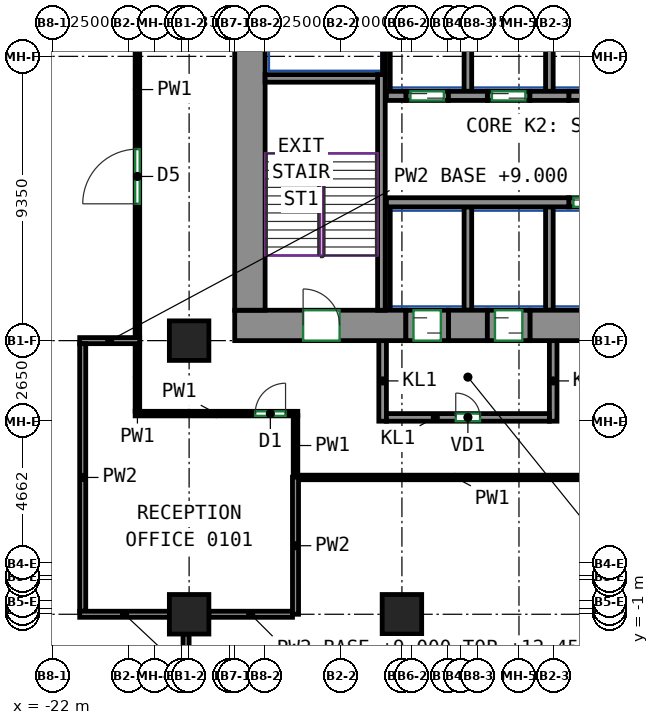
"""IFC4 building model, lengths in metres.
Left out: names, types, materials, properties, quantities, classifications, styles, units other than length and angle.
Written with IfcOpenShell. Run it as: python <this file> out.ifc"""

import sys

from ifc_helpers import new_model, si_unit, direction, frame, frame_2d, origin, origin_2d, place, context, subcontext, project, spatial, rectangle, extrude, source, transform, mapped, element, fill, save


model = new_model("IFC4")
c1 = context("Model", 3, precision=1e-05, world=origin(), true_north=direction((0.0, 1.0)))
c2 = subcontext(c1, "Body", "Model", "MODEL_VIEW")
j1 = project(units=[si_unit("LENGTHUNIT", "METRE"), si_unit("PLANEANGLEUNIT", "RADIAN")], contexts=[c1])
p1 = place(None, origin())
s1 = spatial("IfcSite", under=j1, at=p1, CompositionType="ELEMENT")
p2 = place(p1, origin())
s2 = spatial("IfcBuilding", under=s1, at=p2, CompositionType="ELEMENT")
p3 = place(p2, frame((0.0, 0.0, 9.0)))
s3 = spatial("IfcBuildingStorey", under=s2, at=p3, CompositionType="ELEMENT", Elevation=9.0)
m1 = source(origin(), c2, "Body", "SweptSolid", [
    extrude(rectangle(XDim=1.3, YDim=1.3, at=origin_2d()), origin(), (0.0, 0.0, 1.0), 4.1),
])
for number, where, z_axis, x_axis in (
    (1, (-17.5, -1.0, 0.0), (0.0, 0.0, 1.0), (1.0, 0.0, 0.0)),
    (2, (-17.5, 8.0, 0.0), (0.0, 0.0, 1.0), (1.0, 0.0, 0.0)),
    (3, (-10.5, -1.0, 0.0), (0.0, 0.0, 1.0), (1.0, 0.0, 0.0)),
):
    element("IfcColumn", number, at=place(p3, frame(where, z_axis=z_axis, x_axis=x_axis)), inside=s3, PredefinedType="COLUMN", context=c2, shape_type="MappedRepresentation", body=[
        mapped(m1, transform((0.0, 0.0, 0.0))),
    ])
m2 = source(origin(), c2, "Body", "SweptSolid", [
    extrude(rectangle(XDim=5.63, YDim=1.0, at=frame_2d((2.815, 0.0))), origin(), (0.0, 0.0, 1.0), 4.1),
])
p4 = place(p3, frame((-16.0, 8.5, 0.0), z_axis=(0.0, 0.0, 1.0), x_axis=(1.0, 0.0, 0.0)))
e4 = element("IfcWall", 4, at=p4, inside=s3, PredefinedType="SHEAR", context=c2, shape_type="MappedRepresentation", body=[
    mapped(m2, transform((0.0, 0.0, 0.0))),
])
p5 = place(p4, frame((2.25, 0.0, 0.0)))
e5 = element("IfcOpeningElement", 5, at=p5, cuts=e4, PredefinedType="OPENING", context=c2, shape_type="SweptSolid", body=[
    extrude(rectangle(XDim=1.2, YDim=2.1, at=frame_2d((0.6, 1.05))), frame((0.0, 0.51, 0.0), z_axis=(0.0, -1.0, 0.0), x_axis=(1.0, 0.0, 0.0)), (0.0, 0.0, 1.0), 1.02),
])
m3 = source(origin(), c2, "Body", "SweptSolid", [
    extrude(rectangle(XDim=1.28, YDim=1.0, at=frame_2d((0.64, 0.0))), origin(), (0.0, 0.0, 1.0), 4.1),
])
p6 = place(p3, frame((-8.97, 8.5, 0.0), z_axis=(0.0, 0.0, 1.0), x_axis=(1.0, 0.0, 0.0)))
e6 = element("IfcWall", 6, at=p6, inside=s3, PredefinedType="SHEAR", context=c2, shape_type="MappedRepresentation", body=[
    mapped(m3, transform((0.0, 0.0, 0.0))),
])
m4 = source(origin(), c2, "Body", "SweptSolid", [
    extrude(rectangle(XDim=14.18, YDim=1.0, at=frame_2d((7.09, 0.0))), origin(), (0.0, 0.0, 1.0), 4.1),
])
p7 = place(p3, frame((-6.29, 8.5, 0.0), z_axis=(0.0, 0.0, 1.0), x_axis=(1.0, 0.0, 0.0)))
e7 = element("IfcWall", 7, at=p7, inside=s3, PredefinedType="SHEAR", context=c2, shape_type="MappedRepresentation", body=[
    mapped(m4, transform((0.0, 0.0, 0.0))),
])
m5 = source(origin(), c2, "Body", "SweptSolid", [
    extrude(rectangle(XDim=12.0, YDim=1.0, at=frame_2d((6.0, 0.0))), origin(), (0.0, 0.0, 1.0), 4.1),
])
p8 = place(p3, frame((-15.5, 9.0, 0.0), z_axis=(0.0, 0.0, 1.0), x_axis=(0.0, 1.0, 0.0)))
e8 = element("IfcWall", 8, at=p8, inside=s3, PredefinedType="SHEAR", context=c2, shape_type="MappedRepresentation", body=[
    mapped(m5, transform((0.0, 0.0, 0.0))),
])
m6 = source(origin(), c2, "Body", "SweptSolid", [
    extrude(rectangle(XDim=7.75, YDim=0.25, at=frame_2d((3.875, 0.0))), origin(), (0.0, 0.0, 1.0), 4.1),
])
p9 = place(p3, frame((-11.175, 9.0, 0.0), z_axis=(0.0, 0.0, 1.0), x_axis=(0.0, 1.0, 0.0)))
e9 = element("IfcWall", 9, at=p9, inside=s3, PredefinedType="SHEAR", context=c2, shape_type="MappedRepresentation", body=[
    mapped(m6, transform((0.0, 0.0, 0.0))),
])
m7 = source(origin(), c2, "Body", "SweptSolid", [
    extrude(rectangle(XDim=3.7, YDim=0.25, at=frame_2d((1.85, 0.0))), origin(), (0.0, 0.0, 1.0), 4.1),
])
p10 = place(p3, frame((-15.0, 16.625, 0.0), z_axis=(0.0, 0.0, 1.0), x_axis=(1.0, 0.0, 0.0)))
e10 = element("IfcWall", 10, at=p10, inside=s3, PredefinedType="SHEAR", context=c2, shape_type="MappedRepresentation", body=[
    mapped(m7, transform((0.0, 0.0, 0.0))),
])
m8 = source(origin(), c2, "Body", "SweptSolid", [
    extrude(rectangle(XDim=6.0, YDim=0.3, at=frame_2d((3.0, 0.0))), origin(), (0.0, 0.0, 1.0), 4.1),
])
p11 = place(p3, frame((-11.01, 12.55, 0.0), z_axis=(0.0, 0.0, 1.0), x_axis=(1.0, 0.0, 0.0)))
e11 = element("IfcWall", 11, at=p11, inside=s3, PredefinedType="SHEAR", context=c2, shape_type="MappedRepresentation", body=[
    mapped(m8, transform((0.0, 0.0, 0.0))),
])
m9 = source(origin(), c2, "Body", "SweptSolid", [
    extrude(rectangle(XDim=0.64, YDim=0.3, at=frame_2d((0.32, 0.0))), origin(), (0.0, 0.0, 1.0), 4.1),
])
p12 = place(p3, frame((-11.01, 16.05, 0.0), z_axis=(0.0, 0.0, 1.0), x_axis=(1.0, 0.0, 0.0)))
e12 = element("IfcWall", 12, at=p12, inside=s3, PredefinedType="SHEAR", context=c2, shape_type="MappedRepresentation", body=[
    mapped(m9, transform((0.0, 0.0, 0.0))),
])
m10 = source(origin(), c2, "Body", "SweptSolid", [
    extrude(rectangle(XDim=1.28, YDim=0.3, at=frame_2d((0.64, 0.0))), origin(), (0.0, 0.0, 1.0), 4.1),
])
for number, where, z_axis, x_axis in (
    (13, (-8.97, 16.05, 0.0), (0.0, 0.0, 1.0), (1.0, 0.0, 0.0)),
    (14, (-6.29, 16.05, 0.0), (0.0, 0.0, 1.0), (1.0, 0.0, 0.0)),
):
    element("IfcWall", number, at=place(p3, frame(where, z_axis=z_axis, x_axis=x_axis)), inside=s3, PredefinedType="SHEAR", context=c2, shape_type="MappedRepresentation", body=[
        mapped(m10, transform((0.0, 0.0, 0.0))),
    ])
m11 = source(origin(), c2, "Body", "SweptSolid", [
    extrude(rectangle(XDim=1.4, YDim=0.3, at=frame_2d((0.7, 0.0))), origin(), (0.0, 0.0, 1.0), 4.1),
])
p13 = place(p3, frame((-5.01, 12.55, 0.0), z_axis=(0.0, 0.0, 1.0), x_axis=(1.0, 0.0, 0.0)))
e15 = element("IfcWall", 15, at=p13, inside=s3, PredefinedType="PARTITIONING", context=c2, shape_type="MappedRepresentation", body=[
    mapped(m11, transform((0.0, 0.0, 0.0))),
])
p14 = place(p13, frame((0.15, 0.0, 0.0)))
e16 = element("IfcOpeningElement", 16, at=p14, cuts=e15, PredefinedType="OPENING", context=c2, shape_type="SweptSolid", body=[
    extrude(rectangle(XDim=1.1, YDim=2.1, at=frame_2d((0.55, 1.05))), frame((0.0, 0.16, 0.0), z_axis=(0.0, -1.0, 0.0), x_axis=(1.0, 0.0, 0.0)), (0.0, 0.0, 1.0), 0.32),
])
m12 = source(origin(), c2, "Body", "SweptSolid", [
    extrude(rectangle(XDim=1.4, YDim=0.3, at=frame_2d((0.7, 0.0))), origin(), (0.0, 0.0, 1.0), 4.1),
])
p15 = place(p3, frame((-10.37, 16.05, 0.0), z_axis=(0.0, 0.0, 1.0), x_axis=(1.0, 0.0, 0.0)))
e17 = element("IfcWall", 17, at=p15, inside=s3, PredefinedType="PARTITIONING", context=c2, shape_type="MappedRepresentation", body=[
    mapped(m12, transform((0.0, 0.0, 0.0))),
])
p16 = place(p15, frame((0.15, 0.0, 0.0)))
e18 = element("IfcOpeningElement", 18, at=p16, cuts=e17, PredefinedType="OPENING", context=c2, shape_type="SweptSolid", body=[
    extrude(rectangle(XDim=1.1, YDim=2.1, at=frame_2d((0.55, 1.05))), frame((0.0, 0.16, 0.0), z_axis=(0.0, -1.0, 0.0), x_axis=(1.0, 0.0, 0.0)), (0.0, 0.0, 1.0), 0.32),
])
p17 = place(p3, frame((-7.69, 16.05, 0.0), z_axis=(0.0, 0.0, 1.0), x_axis=(1.0, 0.0, 0.0)))
e19 = element("IfcWall", 19, at=p17, inside=s3, PredefinedType="PARTITIONING", context=c2, shape_type="MappedRepresentation", body=[
    mapped(m11, transform((0.0, 0.0, 0.0))),
])
p18 = place(p17, frame((0.15, 0.0, 0.0)))
e20 = element("IfcOpeningElement", 20, at=p18, cuts=e19, PredefinedType="OPENING", context=c2, shape_type="SweptSolid", body=[
    extrude(rectangle(XDim=1.1, YDim=2.1, at=frame_2d((0.55, 1.05))), frame((0.0, 0.16, 0.0), z_axis=(0.0, -1.0, 0.0), x_axis=(1.0, 0.0, 0.0)), (0.0, 0.0, 1.0), 0.32),
])
p19 = place(p3, frame((-5.01, 16.05, 0.0), z_axis=(0.0, 0.0, 1.0), x_axis=(1.0, 0.0, 0.0)))
e21 = element("IfcWall", 21, at=p19, inside=s3, PredefinedType="PARTITIONING", context=c2, shape_type="MappedRepresentation", body=[
    mapped(m11, transform((0.0, 0.0, 0.0))),
])
m13 = source(origin(), c2, "Body", "SweptSolid", [
    extrude(rectangle(XDim=2.65, YDim=0.25, at=frame_2d((1.325, 0.0))), origin(), (0.0, 0.0, 1.0), 4.1),
])
for number, where, z_axis, x_axis in (
    (22, (-11.135, 5.35, 0.0), (0.0, 0.0, 1.0), (0.0, 1.0, 0.0)),
    (23, (-5.525, 5.35, 0.0), (0.0, 0.0, 1.0), (0.0, 1.0, 0.0)),
):
    element("IfcWall", number, at=place(p3, frame(where, z_axis=z_axis, x_axis=x_axis)), inside=s3, PredefinedType="PARTITIONING", context=c2, shape_type="MappedRepresentation", body=[
        mapped(m13, transform((0.0, 0.0, 0.0))),
    ])
m14 = source(origin(), c2, "Body", "SweptSolid", [
    extrude(rectangle(XDim=5.36, YDim=0.25, at=frame_2d((2.68, 0.0))), origin(), (0.0, 0.0, 1.0), 4.1),
])
p20 = place(p3, frame((-11.01, 5.475, 0.0), z_axis=(0.0, 0.0, 1.0), x_axis=(1.0, 0.0, 0.0)))
e24 = element("IfcWall", 24, at=p20, inside=s3, PredefinedType="PARTITIONING", context=c2, shape_type="MappedRepresentation", body=[
    mapped(m14, transform((0.0, 0.0, 0.0))),
])
p21 = place(p20, frame((2.28, 0.0, 0.0)))
e25 = element("IfcOpeningElement", 25, at=p21, cuts=e24, PredefinedType="OPENING", context=c2, shape_type="SweptSolid", body=[
    extrude(rectangle(XDim=0.8, YDim=2.0, at=frame_2d((0.4, 1.0))), frame((0.0, 0.135, 0.0), z_axis=(0.0, -1.0, 0.0), x_axis=(1.0, 0.0, 0.0)), (0.0, 0.0, 1.0), 0.27),
])
m15 = source(origin(), c2, "Body", "SweptSolid", [
    extrude(rectangle(XDim=3.275, YDim=0.165, at=frame_2d((1.638, 0.0))), origin(), (0.0, 0.0, 1.0), 4.1),
])
p22 = place(p3, frame((-10.968, 16.2, 0.0), z_axis=(0.0, 0.0, 1.0), x_axis=(0.0, 1.0, 0.0)))
e26 = element("IfcWall", 26, at=p22, inside=s3, PredefinedType="PARTITIONING", context=c2, shape_type="MappedRepresentation", body=[
    mapped(m15, transform((0.0, 0.0, 0.0))),
])
m16 = source(origin(), c2, "Body", "SweptSolid", [
    extrude(rectangle(XDim=2.725, YDim=0.085, at=frame_2d((1.363, 0.0))), origin(), (0.0, 0.0, 1.0), 4.1),
])
p23 = place(p3, frame((-11.093, 16.75, 0.0), z_axis=(0.0, 0.0, 1.0), x_axis=(0.0, 1.0, 0.0)))
e27 = element("IfcWall", 27, at=p23, inside=s3, PredefinedType="PARTITIONING", context=c2, shape_type="MappedRepresentation", body=[
    mapped(m16, transform((0.0, 0.0, 0.0))),
])
m17 = source(origin(), c2, "Body", "SweptSolid", [
    extrude(rectangle(XDim=3.275, YDim=0.25, at=frame_2d((1.638, 0.0))), origin(), (0.0, 0.0, 1.0), 4.1),
])
for number, where, z_axis, x_axis in (
    (28, (-5.65, 16.2, 0.0), (0.0, 0.0, 1.0), (0.0, 1.0, 0.0)),
    (29, (-8.33, 16.2, 0.0), (0.0, 0.0, 1.0), (0.0, 1.0, 0.0)),
):
    element("IfcWall", number, at=place(p3, frame(where, z_axis=z_axis, x_axis=x_axis)), inside=s3, PredefinedType="PARTITIONING", context=c2, shape_type="MappedRepresentation", body=[
        mapped(m17, transform((0.0, 0.0, 0.0))),
    ])
m18 = source(origin(), c2, "Body", "SweptSolid", [
    extrude(rectangle(XDim=3.4, YDim=0.165, at=frame_2d((1.7, 0.0))), origin(), (0.0, 0.0, 1.0), 4.1),
])
p24 = place(p3, frame((-10.968, 9.0, 0.0), z_axis=(0.0, 0.0, 1.0), x_axis=(0.0, 1.0, 0.0)))
e30 = element("IfcWall", 30, at=p24, inside=s3, PredefinedType="PARTITIONING", context=c2, shape_type="MappedRepresentation", body=[
    mapped(m18, transform((0.0, 0.0, 0.0))),
])
m19 = source(origin(), c2, "Body", "SweptSolid", [
    extrude(rectangle(XDim=3.4, YDim=0.25, at=frame_2d((1.7, 0.0))), origin(), (0.0, 0.0, 1.0), 4.1),
])
for number, where, z_axis, x_axis in (
    (31, (-5.65, 9.0, 0.0), (0.0, 0.0, 1.0), (0.0, 1.0, 0.0)),
    (32, (-8.33, 9.0, 0.0), (0.0, 0.0, 1.0), (0.0, 1.0, 0.0)),
):
    element("IfcWall", number, at=place(p3, frame(where, z_axis=z_axis, x_axis=x_axis)), inside=s3, PredefinedType="PARTITIONING", context=c2, shape_type="MappedRepresentation", body=[
        mapped(m19, transform((0.0, 0.0, 0.0))),
    ])
m20 = source(origin(), c2, "Body", "SweptSolid", [
    extrude(rectangle(XDim=1.4, YDim=1.0, at=frame_2d((0.7, 0.0))), origin(), (0.0, 0.0, 1.0), 2.7),
])
p25 = place(p3, frame((-10.37, 8.5, 0.0), z_axis=(0.0, 0.0, 1.0), x_axis=(1.0, 0.0, 0.0)))
e33 = element("IfcWall", 33, at=p25, inside=s3, PredefinedType="PARTITIONING", context=c2, shape_type="MappedRepresentation", body=[
    mapped(m20, transform((0.0, 0.0, 0.0))),
])
p26 = place(p25, frame((0.25, 0.0, 0.0)))
e34 = element("IfcOpeningElement", 34, at=p26, cuts=e33, PredefinedType="OPENING", context=c2, shape_type="SweptSolid", body=[
    extrude(rectangle(XDim=0.9, YDim=2.1, at=frame_2d((0.45, 1.05))), frame((0.0, 0.51, 0.0), z_axis=(0.0, -1.0, 0.0), x_axis=(1.0, 0.0, 0.0)), (0.0, 0.0, 1.0), 1.02),
])
m21 = source(origin(), c2, "Body", "SweptSolid", [
    extrude(rectangle(XDim=1.4, YDim=1.0, at=frame_2d((0.7, 0.0))), origin(), (0.0, 0.0, 1.0), 2.7),
])
p27 = place(p3, frame((-7.69, 8.5, 0.0), z_axis=(0.0, 0.0, 1.0), x_axis=(1.0, 0.0, 0.0)))
e35 = element("IfcWall", 35, at=p27, inside=s3, PredefinedType="PARTITIONING", context=c2, shape_type="MappedRepresentation", body=[
    mapped(m21, transform((0.0, 0.0, 0.0))),
])
p28 = place(p27, frame((0.25, 0.0, 0.0)))
e36 = element("IfcOpeningElement", 36, at=p28, cuts=e35, PredefinedType="OPENING", context=c2, shape_type="SweptSolid", body=[
    extrude(rectangle(XDim=0.9, YDim=2.1, at=frame_2d((0.45, 1.05))), frame((0.0, 0.51, 0.0), z_axis=(0.0, -1.0, 0.0), x_axis=(1.0, 0.0, 0.0)), (0.0, 0.0, 1.0), 1.02),
])
p29 = place(p3, frame((-19.2, 8.09, 0.0), z_axis=(0.0, 0.0, 1.0), x_axis=(0.0, 1.0, 0.0)))
e37 = element("IfcWall", 37, at=p29, inside=s3, PredefinedType="PARTITIONING", context=c2, shape_type="SweptSolid", body=[
    extrude(rectangle(XDim=16.335, YDim=0.15, at=frame_2d((8.167, 0.0))), origin(), (0.0, 0.0, 1.0), 4.1),
])
p30 = place(p29, frame((4.41, 0.0, 0.0)))
e38 = element("IfcOpeningElement", 38, at=p30, cuts=e37, PredefinedType="OPENING", context=c2, shape_type="SweptSolid", body=[
    extrude(rectangle(XDim=1.8, YDim=2.1, at=frame_2d((0.9, 1.05))), frame((0.0, 0.085, 0.0), z_axis=(0.0, -1.0, 0.0), x_axis=(1.0, 0.0, 0.0)), (0.0, 0.0, 1.0), 0.17),
])
p31 = place(p3, frame((-14.0, 5.525, 0.0), z_axis=(0.0, 0.0, 1.0), x_axis=(0.0, -1.0, 0.0)))
e39 = element("IfcWall", 39, at=p31, inside=s3, PredefinedType="PARTITIONING", context=c2, shape_type="SweptSolid", body=[
    extrude(rectangle(XDim=1.95, YDim=0.15, at=frame_2d((0.975, 0.0))), origin(), (0.0, 0.0, 1.0), 4.1),
])
p32 = place(p3, frame((-19.275, 5.6, 0.0), z_axis=(0.0, 0.0, 1.0), x_axis=(1.0, 0.0, 0.0)))
e40 = element("IfcWall", 40, at=p32, inside=s3, PredefinedType="PARTITIONING", context=c2, shape_type="SweptSolid", body=[
    extrude(rectangle(XDim=5.35, YDim=0.15, at=frame_2d((2.675, 0.0))), origin(), (0.0, 0.0, 1.0), 4.1),
])
p33 = place(p32, frame((3.947, 0.0, 0.0)))
e41 = element("IfcOpeningElement", 41, at=p33, cuts=e40, PredefinedType="OPENING", context=c2, shape_type="SweptSolid", body=[
    extrude(rectangle(XDim=1.0, YDim=2.1, at=frame_2d((0.5, 1.05))), frame((0.0, 0.085, 0.0), z_axis=(0.0, -1.0, 0.0), x_axis=(1.0, 0.0, 0.0)), (0.0, 0.0, 1.0), 0.17),
])
p34 = place(p3, frame((-19.2, 5.675, 0.0), z_axis=(0.0, 0.0, 1.0), x_axis=(0.0, 1.0, 0.0)))
e42 = element("IfcWall", 42, at=p34, inside=s3, PredefinedType="PARTITIONING", context=c2, shape_type="SweptSolid", body=[
    extrude(rectangle(XDim=2.235, YDim=0.15, at=frame_2d((1.117, 0.0))), origin(), (0.0, 0.0, 1.0), 4.1),
])
p35 = place(p3, frame((-13.901, 3.5, 0.0), z_axis=(0.0, 0.0, 1.0), x_axis=(1.0, 0.0, 0.0)))
e43 = element("IfcWall", 43, at=p35, inside=s3, PredefinedType="PARTITIONING", context=c2, shape_type="SweptSolid", body=[
    extrude(rectangle(XDim=10.302, YDim=0.15, at=frame_2d((5.151, 0.0))), origin(), (0.0, 0.0, 1.0), 4.1),
])
p36 = place(p3, frame((-21.099, 8.0, 0.0), z_axis=(0.0, 0.0, 1.0), x_axis=(1.0, 0.0, 0.0)))
e44 = element("IfcWall", 44, at=p36, inside=s3, PredefinedType="PARTITIONING", context=c2, shape_type="SweptSolid", body=[
    extrude(rectangle(XDim=1.973, YDim=0.2, at=frame_2d((0.987, 0.0))), origin(), (0.0, 0.0, 1.0), 3.45),
])
p37 = place(p3, frame((-21.0, -0.899, 0.0), z_axis=(0.0, 0.0, 1.0), x_axis=(0.0, 1.0, 0.0)))
e45 = element("IfcWall", 45, at=p37, inside=s3, PredefinedType="PARTITIONING", context=c2, shape_type="SweptSolid", body=[
    extrude(rectangle(XDim=8.798, YDim=0.2, at=frame_2d((4.399, 0.0))), origin(), (0.0, 0.0, 1.0), 4.1),
])
p38 = place(p3, frame((-21.099, -1.0, 0.0), z_axis=(0.0, 0.0, 1.0), x_axis=(1.0, 0.0, 0.0)))
e46 = element("IfcWall", 46, at=p38, inside=s3, PredefinedType="PARTITIONING", context=c2, shape_type="SweptSolid", body=[
    extrude(rectangle(XDim=2.949, YDim=0.2, at=frame_2d((1.475, 0.0))), origin(), (0.0, 0.0, 1.0), 3.45),
])
p39 = place(p3, frame((-17.6, -7.75, 0.0), z_axis=(0.0, 0.0, 1.0), x_axis=(0.0, 1.0, 0.0)))
e47 = element("IfcWall", 47, at=p39, inside=s3, PredefinedType="PARTITIONING", context=c2, shape_type="SweptSolid", body=[
    extrude(rectangle(XDim=6.1, YDim=0.2, at=frame_2d((3.05, 0.0))), origin(), (0.0, 0.0, 1.0), 4.1),
])
p40 = place(p3, frame((-16.85, -1.0, 0.0), z_axis=(0.0, 0.0, 1.0), x_axis=(1.0, 0.0, 0.0)))
e48 = element("IfcWall", 48, at=p40, inside=s3, PredefinedType="PARTITIONING", context=c2, shape_type="SweptSolid", body=[
    extrude(rectangle(XDim=2.75, YDim=0.2, at=frame_2d((1.375, 0.0))), origin(), (0.0, 0.0, 1.0), 3.45),
])
p41 = place(p3, frame((-14.0, -1.0, 0.0), z_axis=(0.0, 0.0, 1.0), x_axis=(-0.000216579128, 0.999999976547, 0.0)))
e49 = element("IfcWall", 49, at=p41, inside=s3, PredefinedType="PARTITIONING", context=c2, shape_type="SweptSolid", body=[
    extrude(rectangle(XDim=4.509, YDim=0.2, at=frame_2d((2.254, 0.0))), origin(), (0.0, 0.0, 1.0), 4.1),
])
p42 = place(p21, origin())
e50 = element("IfcDoor", 50, at=p42, inside=s3, OperationType="SINGLE_SWING_LEFT", PredefinedType="DOOR", context=c2, shape_type="SweptSolid", body=[
    extrude(rectangle(XDim=0.8, YDim=2.0, at=frame_2d((0.4, 1.0))), frame((0.0, 0.025, 0.0), z_axis=(0.0, -1.0, 0.0), x_axis=(1.0, 0.0, 0.0)), (0.0, 0.0, 1.0), 0.05),
])
fill(e25, e50)
p43 = place(p26, origin())
e51 = element("IfcDoor", 51, at=p43, inside=s3, OperationType="SLIDING_TO_LEFT", PredefinedType="DOOR", context=c2, shape_type="SweptSolid", body=[
    extrude(rectangle(XDim=0.9, YDim=2.1, at=frame_2d((0.45, 1.05))), frame((0.0, 0.405, 0.0), z_axis=(0.0, -1.0, 0.0), x_axis=(1.0, 0.0, 0.0)), (0.0, 0.0, 1.0), 0.05),
])
fill(e34, e51)
p44 = place(p28, origin())
e52 = element("IfcDoor", 52, at=p44, inside=s3, OperationType="SLIDING_TO_RIGHT", PredefinedType="DOOR", context=c2, shape_type="SweptSolid", body=[
    extrude(rectangle(XDim=0.9, YDim=2.1, at=frame_2d((0.45, 1.05))), frame((0.0, 0.405, 0.0), z_axis=(0.0, -1.0, 0.0), x_axis=(1.0, 0.0, 0.0)), (0.0, 0.0, 1.0), 0.05),
])
fill(e36, e52)
p45 = place(p14, origin())
e53 = element("IfcDoor", 53, at=p45, inside=s3, OperationType="DOUBLE_DOOR_SLIDING", PredefinedType="DOOR", context=c2, shape_type="SweptSolid", body=[
    extrude(rectangle(XDim=1.1, YDim=2.1, at=frame_2d((0.55, 1.05))), frame((0.0, 0.025, 0.0), z_axis=(0.0, -1.0, 0.0), x_axis=(1.0, 0.0, 0.0)), (0.0, 0.0, 1.0), 0.05),
])
fill(e16, e53)
p46 = place(p16, origin())
e54 = element("IfcDoor", 54, at=p46, inside=s3, OperationType="DOUBLE_DOOR_SLIDING", PredefinedType="DOOR", context=c2, shape_type="SweptSolid", body=[
    extrude(rectangle(XDim=1.1, YDim=2.1, at=frame_2d((0.55, 1.05))), frame((0.0, 0.025, 0.0), z_axis=(0.0, -1.0, 0.0), x_axis=(1.0, 0.0, 0.0)), (0.0, 0.0, 1.0), 0.05),
])
fill(e18, e54)
p47 = place(p18, origin())
e55 = element("IfcDoor", 55, at=p47, inside=s3, OperationType="DOUBLE_DOOR_SLIDING", PredefinedType="DOOR", context=c2, shape_type="SweptSolid", body=[
    extrude(rectangle(XDim=1.1, YDim=2.1, at=frame_2d((0.55, 1.05))), frame((0.0, 0.025, 0.0), z_axis=(0.0, -1.0, 0.0), x_axis=(1.0, 0.0, 0.0)), (0.0, 0.0, 1.0), 0.05),
])
fill(e20, e55)
p48 = place(p5, origin())
e56 = element("IfcDoor", 56, at=p48, inside=s3, OperationType="DOUBLE_DOOR_SINGLE_SWING", PredefinedType="DOOR", context=c2, shape_type="SweptSolid", body=[
    extrude(rectangle(XDim=1.2, YDim=2.1, at=frame_2d((0.6, 1.05))), frame((0.0, 0.405, 0.0), z_axis=(0.0, -1.0, 0.0), x_axis=(1.0, 0.0, 0.0)), (0.0, 0.0, 1.0), 0.05),
])
fill(e5, e56)
p49 = place(p33, origin())
e57 = element("IfcDoor", 57, at=p49, inside=s3, OperationType="SINGLE_SWING_RIGHT", PredefinedType="DOOR", context=c2, shape_type="SweptSolid", body=[
    extrude(rectangle(XDim=1.0, YDim=2.1, at=frame_2d((0.5, 1.05))), frame((0.0, 0.025, 0.0), z_axis=(0.0, -1.0, 0.0), x_axis=(1.0, 0.0, 0.0)), (0.0, 0.0, 1.0), 0.05),
])
fill(e41, e57)
p50 = place(p30, origin())
e58 = element("IfcDoor", 58, at=p50, inside=s3, OperationType="DOUBLE_DOOR_SINGLE_SWING", PredefinedType="DOOR", context=c2, shape_type="SweptSolid", body=[
    extrude(rectangle(XDim=1.8, YDim=2.1, at=frame_2d((0.9, 1.05))), frame((0.0, 0.025, 0.0), z_axis=(0.0, -1.0, 0.0), x_axis=(1.0, 0.0, 0.0)), (0.0, 0.0, 1.0), 0.05),
])
fill(e38, e58)
save(model, sys.argv[1])
